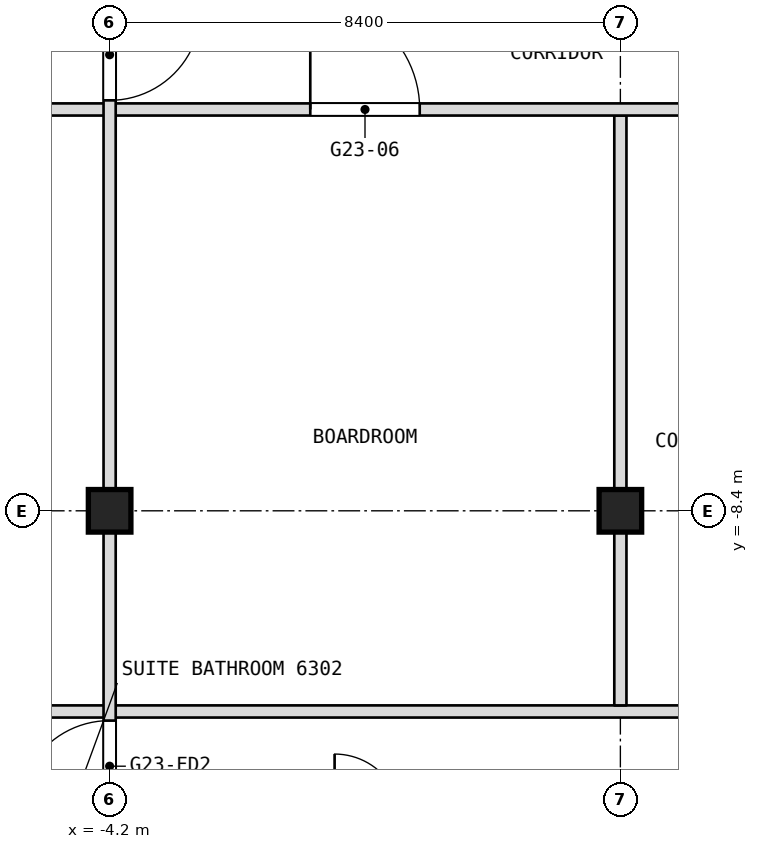
"""IFC4 building model, lengths in metres.
Left out: names, types, materials, properties, quantities, classifications, styles, units other than length and angle.
Written with IfcOpenShell. Run it as: python <this file> out.ifc"""

import sys

from ifc_helpers import new_model, si_unit, direction, frame, frame_2d, origin, origin_2d, place, context, subcontext, project, spatial, rectangle, extrude, element, fill, save


model = new_model("IFC4")
c1 = context("Model", 3, precision=1e-05, world=origin(), true_north=direction((0.0, 1.0)))
c2 = subcontext(c1, "Body", "Model", "MODEL_VIEW")
j1 = project(units=[si_unit("LENGTHUNIT", "METRE"), si_unit("PLANEANGLEUNIT", "RADIAN")], contexts=[c1])
p1 = place(None, origin())
s1 = spatial("IfcSite", under=j1, at=p1, CompositionType="ELEMENT")
p2 = place(p1, origin())
s2 = spatial("IfcBuilding", under=s1, at=p2, CompositionType="ELEMENT")
p3 = place(p2, frame((0.0, 0.0, 274.1)))
s3 = spatial("IfcBuildingStorey", under=s2, at=p3, CompositionType="ELEMENT", Elevation=274.1)
for number, where, z_axis, x_axis in (
    (1, (-4.2, -8.4, 0.0), (0.0, 0.0, 1.0), (1.0, 0.0, 0.0)),
    (2, (4.2, -8.4, 0.0), (0.0, 0.0, 1.0), (1.0, 0.0, 0.0)),
):
    element("IfcColumn", number, at=place(p3, frame(where, z_axis=z_axis, x_axis=x_axis)), inside=s3, PredefinedType="COLUMN", context=c2, shape_type="SweptSolid", body=[
        extrude(rectangle(XDim=0.7, YDim=0.7, at=origin_2d()), origin(), (0.0, 0.0, 1.0), 3.6),
    ])
p4 = place(p3, frame((-8.3, -11.7, 0.0), z_axis=(0.0, 0.0, 1.0), x_axis=(1.0, 0.0, 0.0)))
e3 = element("IfcWall", 3, at=p4, inside=s3, PredefinedType="PARTITIONING", context=c2, shape_type="SweptSolid", body=[
    extrude(rectangle(XDim=25.0, YDim=0.2, at=frame_2d((12.5, 0.0))), origin(), (0.0, 0.0, 1.0), 3.34),
])
p5 = place(p3, frame((4.2, -11.6, 0.0), z_axis=(0.0, 0.0, 1.0), x_axis=(0.0, 1.0, 0.0)))
e4 = element("IfcWall", 4, at=p5, inside=s3, PredefinedType="PARTITIONING", context=c2, shape_type="SweptSolid", body=[
    extrude(rectangle(XDim=9.7, YDim=0.2, at=frame_2d((4.85, 0.0))), origin(), (0.0, 0.0, 1.0), 3.34),
])
p6 = place(p3, frame((-16.9, -1.8, 0.0), z_axis=(0.0, 0.0, 1.0), x_axis=(1.0, 0.0, 0.0)))
e5 = element("IfcWall", 5, at=p6, inside=s3, PredefinedType="PARTITIONING", context=c2, shape_type="SweptSolid", body=[
    extrude(rectangle(XDim=33.8, YDim=0.2, at=frame_2d((16.9, 0.0))), origin(), (0.0, 0.0, 1.0), 3.34),
])
p7 = place(p6, frame((1.7, 0.0, 0.0)))
e6 = element("IfcOpeningElement", 6, at=p7, cuts=e5, PredefinedType="OPENING", context=c2, shape_type="SweptSolid", body=[
    extrude(rectangle(XDim=1.0, YDim=2.1, at=frame_2d((0.5, 1.05))), frame((0.0, 0.1, 0.0), z_axis=(0.0, -1.0, 0.0), x_axis=(1.0, 0.0, 0.0)), (0.0, 0.0, 1.0), 0.2),
])
p8 = place(p6, frame((5.9, 0.0, 0.0)))
e7 = element("IfcOpeningElement", 7, at=p8, cuts=e5, PredefinedType="OPENING", context=c2, shape_type="SweptSolid", body=[
    extrude(rectangle(XDim=1.0, YDim=2.1, at=frame_2d((0.5, 1.05))), frame((0.0, 0.1, 0.0), z_axis=(0.0, -1.0, 0.0), x_axis=(1.0, 0.0, 0.0)), (0.0, 0.0, 1.0), 0.2),
])
p9 = place(p6, frame((10.1, 0.0, 0.0)))
e8 = element("IfcOpeningElement", 8, at=p9, cuts=e5, PredefinedType="OPENING", context=c2, shape_type="SweptSolid", body=[
    extrude(rectangle(XDim=1.0, YDim=2.1, at=frame_2d((0.5, 1.05))), frame((0.0, 0.1, 0.0), z_axis=(0.0, -1.0, 0.0), x_axis=(1.0, 0.0, 0.0)), (0.0, 0.0, 1.0), 0.2),
])
p10 = place(p6, frame((16.0, 0.0, 0.0)))
e9 = element("IfcOpeningElement", 9, at=p10, cuts=e5, PredefinedType="OPENING", context=c2, shape_type="SweptSolid", body=[
    extrude(rectangle(XDim=1.8, YDim=2.1, at=frame_2d((0.9, 1.05))), frame((0.0, 0.1, 0.0), z_axis=(0.0, -1.0, 0.0), x_axis=(1.0, 0.0, 0.0)), (0.0, 0.0, 1.0), 0.2),
])
p11 = place(p6, frame((22.7, 0.0, 0.0)))
e10 = element("IfcOpeningElement", 10, at=p11, cuts=e5, PredefinedType="OPENING", context=c2, shape_type="SweptSolid", body=[
    extrude(rectangle(XDim=1.0, YDim=2.1, at=frame_2d((0.5, 1.05))), frame((0.0, 0.1, 0.0), z_axis=(0.0, -1.0, 0.0), x_axis=(1.0, 0.0, 0.0)), (0.0, 0.0, 1.0), 0.2),
])
p12 = place(p6, frame((26.9, 0.0, 0.0)))
e11 = element("IfcOpeningElement", 11, at=p12, cuts=e5, PredefinedType="OPENING", context=c2, shape_type="SweptSolid", body=[
    extrude(rectangle(XDim=1.0, YDim=2.1, at=frame_2d((0.5, 1.05))), frame((0.0, 0.1, 0.0), z_axis=(0.0, -1.0, 0.0), x_axis=(1.0, 0.0, 0.0)), (0.0, 0.0, 1.0), 0.2),
])
p13 = place(p6, frame((31.1, 0.0, 0.0)))
e12 = element("IfcOpeningElement", 12, at=p13, cuts=e5, PredefinedType="OPENING", context=c2, shape_type="SweptSolid", body=[
    extrude(rectangle(XDim=1.0, YDim=2.1, at=frame_2d((0.5, 1.05))), frame((0.0, 0.1, 0.0), z_axis=(0.0, -1.0, 0.0), x_axis=(1.0, 0.0, 0.0)), (0.0, 0.0, 1.0), 0.2),
])
p14 = place(p3, frame((-4.2, -13.6, 0.0), z_axis=(0.0, 0.0, 1.0), x_axis=(0.0, 1.0, 0.0)))
e13 = element("IfcWall", 13, at=p14, inside=s3, PredefinedType="PARTITIONING", context=c2, shape_type="SweptSolid", body=[
    extrude(rectangle(XDim=13.6, YDim=0.2, at=frame_2d((6.8, 0.0))), origin(), (0.0, 0.0, 1.0), 3.34),
])
p15 = place(p14, frame((11.95, 0.0, 0.0)))
e14 = element("IfcOpeningElement", 14, at=p15, cuts=e13, PredefinedType="OPENING", context=c2, shape_type="SweptSolid", body=[
    extrude(rectangle(XDim=1.5, YDim=2.1, at=frame_2d((0.75, 1.05))), frame((0.0, 0.1, 0.0), z_axis=(0.0, -1.0, 0.0), x_axis=(1.0, 0.0, 0.0)), (0.0, 0.0, 1.0), 0.2),
])
p16 = place(p14, frame((0.25, 0.0, 0.0)))
e15 = element("IfcOpeningElement", 15, at=p16, cuts=e13, PredefinedType="OPENING", context=c2, shape_type="SweptSolid", body=[
    extrude(rectangle(XDim=1.5, YDim=2.1, at=frame_2d((0.75, 1.05))), frame((0.0, 0.1, 0.0), z_axis=(0.0, -1.0, 0.0), x_axis=(1.0, 0.0, 0.0)), (0.0, 0.0, 1.0), 0.2),
])
p17 = place(p10, origin())
e16 = element("IfcDoor", 16, at=p17, inside=s3, OperationType="DOUBLE_DOOR_SINGLE_SWING", PredefinedType="DOOR", context=c2, shape_type="SweptSolid", body=[
    extrude(rectangle(XDim=1.8, YDim=2.1, at=frame_2d((0.9, 1.05))), frame((0.0, 0.025, 0.0), z_axis=(0.0, -1.0, 0.0), x_axis=(1.0, 0.0, 0.0)), (0.0, 0.0, 1.0), 0.05),
])
fill(e9, e16)
p18 = place(p15, origin())
e17 = element("IfcDoor", 17, at=p18, inside=s3, OperationType="DOUBLE_DOOR_DOUBLE_SWING", PredefinedType="DOOR", context=c2, shape_type="SweptSolid", body=[
    extrude(rectangle(XDim=1.5, YDim=2.1, at=frame_2d((0.75, 1.05))), frame((0.0, 0.025, 0.0), z_axis=(0.0, -1.0, 0.0), x_axis=(1.0, 0.0, 0.0)), (0.0, 0.0, 1.0), 0.05),
])
fill(e14, e17)
p19 = place(p16, origin())
e18 = element("IfcDoor", 18, at=p19, inside=s3, OperationType="DOUBLE_DOOR_DOUBLE_SWING", PredefinedType="DOOR", context=c2, shape_type="SweptSolid", body=[
    extrude(rectangle(XDim=1.5, YDim=2.1, at=frame_2d((0.75, 1.05))), frame((0.0, 0.025, 0.0), z_axis=(0.0, -1.0, 0.0), x_axis=(1.0, 0.0, 0.0)), (0.0, 0.0, 1.0), 0.05),
])
fill(e15, e18)
save(model, sys.argv[1])
